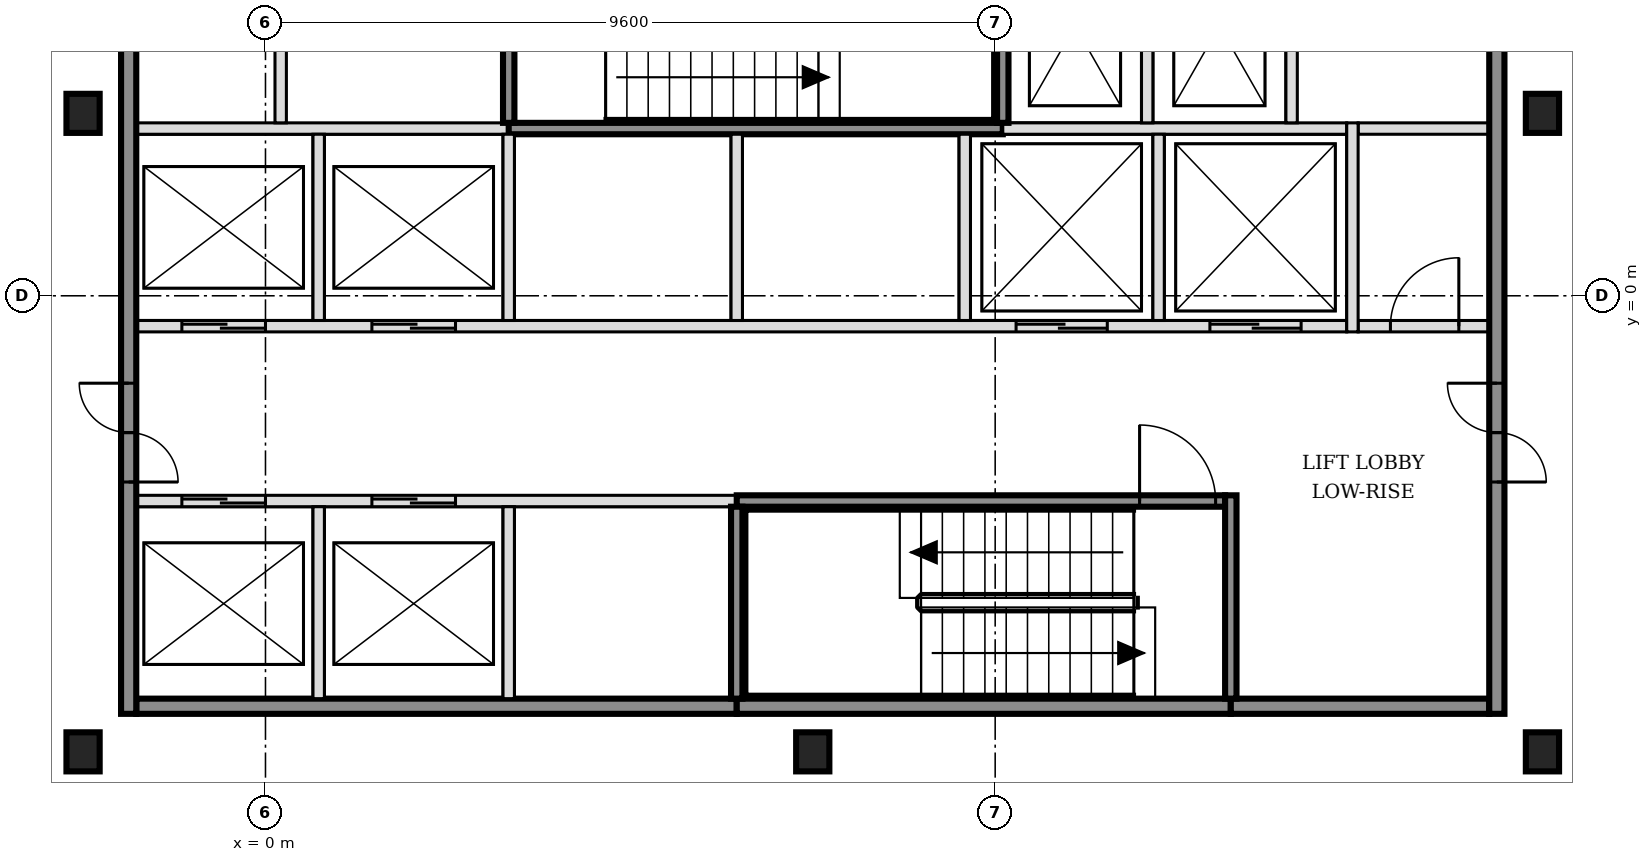
"""IFC4 building model, lengths in metres.
Left out: names, types, materials, properties, quantities, classifications, styles, units other than length and angle.
Written with IfcOpenShell. Run it as: python <this file> out.ifc"""

import sys

from ifc_helpers import new_model, si_unit, direction, frame, frame_2d, origin, origin_2d, place, context, subcontext, project, spatial, rectangle, i_section, extrude, element, fill, save


model = new_model("IFC4")
c1 = context("Model", 3, precision=1e-05, world=origin(), true_north=direction((0.0, 1.0)))
c2 = subcontext(c1, "Body", "Model", "MODEL_VIEW")
j1 = project(units=[si_unit("LENGTHUNIT", "METRE"), si_unit("PLANEANGLEUNIT", "RADIAN")], contexts=[c1])
p1 = place(None, origin())
s1 = spatial("IfcSite", under=j1, at=p1, CompositionType="ELEMENT")
p2 = place(p1, origin())
s2 = spatial("IfcBuilding", under=s1, at=p2, CompositionType="ELEMENT")
p3 = place(p2, frame((0.0, 0.0, 83.4)))
s3 = spatial("IfcBuildingStorey", under=s2, at=p3, CompositionType="ELEMENT", Elevation=83.4)
for number, where, z_axis, x_axis in (
    (1, (-2.4, -6.0, -0.15), (0.0, 0.0, 1.0), (1.0, 0.0, 0.0)),
    (2, (7.2, -6.0, -0.15), (0.0, 0.0, 1.0), (1.0, 0.0, 0.0)),
    (3, (16.8, -6.0, -0.15), (0.0, 0.0, 1.0), (1.0, 0.0, 0.0)),
    (4, (-2.4, 2.4, -0.15), (0.0, 0.0, 1.0), (1.0, 0.0, 0.0)),
    (5, (16.8, 2.4, -0.15), (0.0, 0.0, 1.0), (1.0, 0.0, 0.0)),
):
    element("IfcColumn", number, at=place(p3, frame(where, z_axis=z_axis, x_axis=x_axis)), inside=s3, PredefinedType="COLUMN", context=c2, shape_type="SweptSolid", body=[
        extrude(i_section(OverallWidth=0.437, OverallDepth=0.514, WebThickness=0.061, FlangeThickness=0.097, FilletRadius=0.015, at=origin_2d()), origin(), (0.0, 0.0, 1.0), 3.6),
    ])
p4 = place(p3, frame((-1.7, -5.4, 0.0), z_axis=(0.0, 0.0, 1.0), x_axis=(1.0, 0.0, 0.0)))
e6 = element("IfcWall", 6, at=p4, inside=s3, PredefinedType="SOLIDWALL", context=c2, shape_type="SweptSolid", body=[
    extrude(rectangle(XDim=7.9, YDim=0.2, at=frame_2d((3.95, 0.0))), origin(), (0.0, 0.0, 1.0), 3.45),
])
p5 = place(p3, frame((6.2, -5.4, 0.0), z_axis=(0.0, 0.0, 1.0), x_axis=(1.0, 0.0, 0.0)))
e7 = element("IfcWall", 7, at=p5, inside=s3, PredefinedType="SOLIDWALL", context=c2, shape_type="SweptSolid", body=[
    extrude(rectangle(XDim=6.5, YDim=0.2, at=frame_2d((3.25, 0.0))), origin(), (0.0, 0.0, 1.0), 3.45),
])
p6 = place(p3, frame((12.7, -5.4, 0.0), z_axis=(0.0, 0.0, 1.0), x_axis=(1.0, 0.0, 0.0)))
e8 = element("IfcWall", 8, at=p6, inside=s3, PredefinedType="SOLIDWALL", context=c2, shape_type="SweptSolid", body=[
    extrude(rectangle(XDim=3.4, YDim=0.2, at=frame_2d((1.7, 0.0))), origin(), (0.0, 0.0, 1.0), 3.45),
])
p7 = place(p3, frame((-1.7, -2.7, 0.0), z_axis=(0.0, 0.0, 1.0), x_axis=(1.0, 0.0, 0.0)))
e9 = element("IfcWall", 9, at=p7, inside=s3, PredefinedType="SOLIDWALL", context=c2, shape_type="SweptSolid", body=[
    extrude(rectangle(XDim=7.9, YDim=0.15, at=frame_2d((3.95, 0.0))), origin(), (0.0, 0.0, 1.0), 3.45),
])
p8 = place(p7, frame((0.6, 0.0, 0.0)))
e10 = element("IfcOpeningElement", 10, at=p8, cuts=e9, PredefinedType="OPENING", context=c2, shape_type="SweptSolid", body=[
    extrude(rectangle(XDim=1.1, YDim=2.1, at=frame_2d((0.55, 1.05))), frame((0.0, 0.085, 0.0), z_axis=(0.0, -1.0, 0.0), x_axis=(1.0, 0.0, 0.0)), (0.0, 0.0, 1.0), 0.17),
])
p9 = place(p7, frame((3.1, 0.0, 0.0)))
e11 = element("IfcOpeningElement", 11, at=p9, cuts=e9, PredefinedType="OPENING", context=c2, shape_type="SweptSolid", body=[
    extrude(rectangle(XDim=1.1, YDim=2.1, at=frame_2d((0.55, 1.05))), frame((0.0, 0.085, 0.0), z_axis=(0.0, -1.0, 0.0), x_axis=(1.0, 0.0, 0.0)), (0.0, 0.0, 1.0), 0.17),
])
p10 = place(p3, frame((6.2, -2.7, 0.0), z_axis=(0.0, 0.0, 1.0), x_axis=(1.0, 0.0, 0.0)))
e12 = element("IfcWall", 12, at=p10, inside=s3, PredefinedType="SOLIDWALL", context=c2, shape_type="SweptSolid", body=[
    extrude(rectangle(XDim=6.425, YDim=0.15, at=frame_2d((3.212, 0.0))), origin(), (0.0, 0.0, 1.0), 3.45),
])
p11 = place(p10, frame((5.3, 0.0, 0.0)))
e13 = element("IfcOpeningElement", 13, at=p11, cuts=e12, PredefinedType="OPENING", context=c2, shape_type="SweptSolid", body=[
    extrude(rectangle(XDim=1.0, YDim=2.1, at=frame_2d((0.5, 1.05))), frame((0.0, 0.085, 0.0), z_axis=(0.0, -1.0, 0.0), x_axis=(1.0, 0.0, 0.0)), (0.0, 0.0, 1.0), 0.17),
])
p12 = place(p3, frame((-1.7, -0.4, 0.0), z_axis=(0.0, 0.0, 1.0), x_axis=(1.0, 0.0, 0.0)))
e14 = element("IfcWall", 14, at=p12, inside=s3, PredefinedType="SOLIDWALL", context=c2, shape_type="SweptSolid", body=[
    extrude(rectangle(XDim=15.925, YDim=0.15, at=frame_2d((7.962, 0.0))), origin(), (0.0, 0.0, 1.0), 3.45),
])
p13 = place(p12, frame((0.6, 0.0, 0.0)))
e15 = element("IfcOpeningElement", 15, at=p13, cuts=e14, PredefinedType="OPENING", context=c2, shape_type="SweptSolid", body=[
    extrude(rectangle(XDim=1.1, YDim=2.1, at=frame_2d((0.55, 1.05))), frame((0.0, 0.085, 0.0), z_axis=(0.0, -1.0, 0.0), x_axis=(1.0, 0.0, 0.0)), (0.0, 0.0, 1.0), 0.17),
])
p14 = place(p12, frame((3.1, 0.0, 0.0)))
e16 = element("IfcOpeningElement", 16, at=p14, cuts=e14, PredefinedType="OPENING", context=c2, shape_type="SweptSolid", body=[
    extrude(rectangle(XDim=1.1, YDim=2.1, at=frame_2d((0.55, 1.05))), frame((0.0, 0.085, 0.0), z_axis=(0.0, -1.0, 0.0), x_axis=(1.0, 0.0, 0.0)), (0.0, 0.0, 1.0), 0.17),
])
p15 = place(p12, frame((11.575, 0.0, 0.0)))
e17 = element("IfcOpeningElement", 17, at=p15, cuts=e14, PredefinedType="OPENING", context=c2, shape_type="SweptSolid", body=[
    extrude(rectangle(XDim=1.2, YDim=2.1, at=frame_2d((0.6, 1.05))), frame((0.0, 0.085, 0.0), z_axis=(0.0, -1.0, 0.0), x_axis=(1.0, 0.0, 0.0)), (0.0, 0.0, 1.0), 0.17),
])
p16 = place(p12, frame((14.125, 0.0, 0.0)))
e18 = element("IfcOpeningElement", 18, at=p16, cuts=e14, PredefinedType="OPENING", context=c2, shape_type="SweptSolid", body=[
    extrude(rectangle(XDim=1.2, YDim=2.1, at=frame_2d((0.6, 1.05))), frame((0.0, 0.085, 0.0), z_axis=(0.0, -1.0, 0.0), x_axis=(1.0, 0.0, 0.0)), (0.0, 0.0, 1.0), 0.17),
])
p17 = place(p3, frame((14.375, -0.4, 0.0), z_axis=(0.0, 0.0, 1.0), x_axis=(1.0, 0.0, 0.0)))
e19 = element("IfcWall", 19, at=p17, inside=s3, PredefinedType="PARTITIONING", context=c2, shape_type="SweptSolid", body=[
    extrude(rectangle(XDim=1.725, YDim=0.15, at=frame_2d((0.863, 0.0))), origin(), (0.0, 0.0, 1.0), 3.45),
])
p18 = place(p17, frame((0.425, 0.0, 0.0)))
e20 = element("IfcOpeningElement", 20, at=p18, cuts=e19, PredefinedType="OPENING", context=c2, shape_type="SweptSolid", body=[
    extrude(rectangle(XDim=0.9, YDim=2.1, at=frame_2d((0.45, 1.05))), frame((0.0, 0.085, 0.0), z_axis=(0.0, -1.0, 0.0), x_axis=(1.0, 0.0, 0.0)), (0.0, 0.0, 1.0), 0.17),
])
p19 = place(p3, frame((-1.7, 2.2, 0.0), z_axis=(0.0, 0.0, 1.0), x_axis=(1.0, 0.0, 0.0)))
e21 = element("IfcWall", 21, at=p19, inside=s3, PredefinedType="SOLIDWALL", context=c2, shape_type="SweptSolid", body=[
    extrude(rectangle(XDim=4.9, YDim=0.15, at=frame_2d((2.45, 0.0))), origin(), (0.0, 0.0, 1.0), 3.45),
])
p20 = place(p3, frame((3.2, 2.2, 0.0), z_axis=(0.0, 0.0, 1.0), x_axis=(1.0, 0.0, 0.0)))
e22 = element("IfcWall", 22, at=p20, inside=s3, PredefinedType="SOLIDWALL", context=c2, shape_type="SweptSolid", body=[
    extrude(rectangle(XDim=6.5, YDim=0.15, at=frame_2d((3.25, 0.0))), origin(), (0.0, 0.0, 1.0), 3.45),
])
p21 = place(p3, frame((9.7, 2.2, 0.0), z_axis=(0.0, 0.0, 1.0), x_axis=(1.0, 0.0, 0.0)))
e23 = element("IfcWall", 23, at=p21, inside=s3, PredefinedType="SOLIDWALL", context=c2, shape_type="SweptSolid", body=[
    extrude(rectangle(XDim=4.525, YDim=0.15, at=frame_2d((2.263, 0.0))), origin(), (0.0, 0.0, 1.0), 3.45),
])
p22 = place(p3, frame((14.375, 2.2, 0.0), z_axis=(0.0, 0.0, 1.0), x_axis=(1.0, 0.0, 0.0)))
e24 = element("IfcWall", 24, at=p22, inside=s3, PredefinedType="PARTITIONING", context=c2, shape_type="SweptSolid", body=[
    extrude(rectangle(XDim=1.725, YDim=0.15, at=frame_2d((0.863, 0.0))), origin(), (0.0, 0.0, 1.0), 3.45),
])
p23 = place(p3, frame((-1.8, -5.5, 0.0), z_axis=(0.0, 0.0, 1.0), x_axis=(0.0, 1.0, 0.0)))
e25 = element("IfcWall", 25, at=p23, inside=s3, PredefinedType="SOLIDWALL", context=c2, shape_type="SweptSolid", body=[
    extrude(rectangle(XDim=15.8, YDim=0.2, at=frame_2d((7.9, 0.0))), origin(), (0.0, 0.0, 1.0), 3.45),
])
p24 = place(p23, frame((3.05, 0.0, 0.0)))
e26 = element("IfcOpeningElement", 26, at=p24, cuts=e25, PredefinedType="OPENING", context=c2, shape_type="SweptSolid", body=[
    extrude(rectangle(XDim=1.3, YDim=2.1, at=frame_2d((0.65, 1.05))), frame((0.0, 0.11, 0.0), z_axis=(0.0, -1.0, 0.0), x_axis=(1.0, 0.0, 0.0)), (0.0, 0.0, 1.0), 0.22),
])
p25 = place(p23, frame((11.45, 0.0, 0.0)))
e27 = element("IfcOpeningElement", 27, at=p25, cuts=e25, PredefinedType="OPENING", context=c2, shape_type="SweptSolid", body=[
    extrude(rectangle(XDim=1.3, YDim=2.1, at=frame_2d((0.65, 1.05))), frame((0.0, 0.11, 0.0), z_axis=(0.0, -1.0, 0.0), x_axis=(1.0, 0.0, 0.0)), (0.0, 0.0, 1.0), 0.22),
])
p26 = place(p3, frame((0.2, 2.275, 0.0), z_axis=(0.0, 0.0, 1.0), x_axis=(0.0, 1.0, 0.0)))
e28 = element("IfcWall", 28, at=p26, inside=s3, PredefinedType="PARTITIONING", context=c2, shape_type="SweptSolid", body=[
    extrude(rectangle(XDim=2.55, YDim=0.15, at=frame_2d((1.275, 0.0))), origin(), (0.0, 0.0, 1.0), 3.45),
])
p27 = place(p3, frame((0.7, -5.3, 0.0), z_axis=(0.0, 0.0, 1.0), x_axis=(0.0, 1.0, 0.0)))
e29 = element("IfcWall", 29, at=p27, inside=s3, PredefinedType="SOLIDWALL", context=c2, shape_type="SweptSolid", body=[
    extrude(rectangle(XDim=2.525, YDim=0.15, at=frame_2d((1.263, 0.0))), origin(), (0.0, 0.0, 1.0), 3.45),
])
p28 = place(p3, frame((0.7, -0.325, 0.0), z_axis=(0.0, 0.0, 1.0), x_axis=(0.0, 1.0, 0.0)))
e30 = element("IfcWall", 30, at=p28, inside=s3, PredefinedType="SOLIDWALL", context=c2, shape_type="SweptSolid", body=[
    extrude(rectangle(XDim=2.45, YDim=0.15, at=frame_2d((1.225, 0.0))), origin(), (0.0, 0.0, 1.0), 3.45),
])
p29 = place(p3, frame((3.2, -5.3, 0.0), z_axis=(0.0, 0.0, 1.0), x_axis=(0.0, 1.0, 0.0)))
e31 = element("IfcWall", 31, at=p29, inside=s3, PredefinedType="SOLIDWALL", context=c2, shape_type="SweptSolid", body=[
    extrude(rectangle(XDim=2.525, YDim=0.15, at=frame_2d((1.263, 0.0))), origin(), (0.0, 0.0, 1.0), 3.45),
])
p30 = place(p3, frame((3.2, -0.325, 0.0), z_axis=(0.0, 0.0, 1.0), x_axis=(0.0, 1.0, 0.0)))
e32 = element("IfcWall", 32, at=p30, inside=s3, PredefinedType="SOLIDWALL", context=c2, shape_type="SweptSolid", body=[
    extrude(rectangle(XDim=2.45, YDim=0.15, at=frame_2d((1.225, 0.0))), origin(), (0.0, 0.0, 1.0), 3.45),
])
p31 = place(p3, frame((3.2, 2.275, 0.0), z_axis=(0.0, 0.0, 1.0), x_axis=(0.0, 1.0, 0.0)))
e33 = element("IfcWall", 33, at=p31, inside=s3, PredefinedType="SOLIDWALL", context=c2, shape_type="SweptSolid", body=[
    extrude(rectangle(XDim=2.7, YDim=0.15, at=frame_2d((1.35, 0.0))), origin(), (0.0, 0.0, 1.0), 3.45),
])
p32 = place(p3, frame((6.2, -5.3, 0.0), z_axis=(0.0, 0.0, 1.0), x_axis=(0.0, 1.0, 0.0)))
e34 = element("IfcWall", 34, at=p32, inside=s3, PredefinedType="SOLIDWALL", context=c2, shape_type="SweptSolid", body=[
    extrude(rectangle(XDim=2.525, YDim=0.15, at=frame_2d((1.263, 0.0))), origin(), (0.0, 0.0, 1.0), 3.45),
])
for number, where, z_axis, x_axis in (
    (35, (6.2, -0.325, 0.0), (0.0, 0.0, 1.0), (0.0, 1.0, 0.0)),
    (36, (9.2, -0.325, 0.0), (0.0, 0.0, 1.0), (0.0, 1.0, 0.0)),
):
    element("IfcWall", number, at=place(p3, frame(where, z_axis=z_axis, x_axis=x_axis)), inside=s3, PredefinedType="SOLIDWALL", context=c2, shape_type="SweptSolid", body=[
        extrude(rectangle(XDim=2.45, YDim=0.15, at=frame_2d((1.225, 0.0))), origin(), (0.0, 0.0, 1.0), 3.45),
    ])
for number, where, z_axis, x_axis in (
    (37, (9.7, 2.275, 0.0), (0.0, 0.0, 1.0), (0.0, 1.0, 0.0)),
    (38, (11.6, 2.275, 0.0), (0.0, 0.0, 1.0), (0.0, 1.0, 0.0)),
):
    element("IfcWall", number, at=place(p3, frame(where, z_axis=z_axis, x_axis=x_axis)), inside=s3, PredefinedType="SOLIDWALL", context=c2, shape_type="SweptSolid", body=[
        extrude(rectangle(XDim=2.55, YDim=0.15, at=frame_2d((1.275, 0.0))), origin(), (0.0, 0.0, 1.0), 3.45),
    ])
p33 = place(p3, frame((11.75, -0.325, 0.0), z_axis=(0.0, 0.0, 1.0), x_axis=(0.0, 1.0, 0.0)))
e39 = element("IfcWall", 39, at=p33, inside=s3, PredefinedType="SOLIDWALL", context=c2, shape_type="SweptSolid", body=[
    extrude(rectangle(XDim=2.45, YDim=0.15, at=frame_2d((1.225, 0.0))), origin(), (0.0, 0.0, 1.0), 3.45),
])
p34 = place(p3, frame((12.7, -5.3, 0.0), z_axis=(0.0, 0.0, 1.0), x_axis=(0.0, 1.0, 0.0)))
e40 = element("IfcWall", 40, at=p34, inside=s3, PredefinedType="SOLIDWALL", context=c2, shape_type="SweptSolid", body=[
    extrude(rectangle(XDim=2.675, YDim=0.15, at=frame_2d((1.337, 0.0))), origin(), (0.0, 0.0, 1.0), 3.45),
])
p35 = place(p3, frame((13.5, 2.275, 0.0), z_axis=(0.0, 0.0, 1.0), x_axis=(0.0, 1.0, 0.0)))
e41 = element("IfcWall", 41, at=p35, inside=s3, PredefinedType="SOLIDWALL", context=c2, shape_type="SweptSolid", body=[
    extrude(rectangle(XDim=2.55, YDim=0.15, at=frame_2d((1.275, 0.0))), origin(), (0.0, 0.0, 1.0), 3.45),
])
p36 = place(p3, frame((14.3, -0.475, 0.0), z_axis=(0.0, 0.0, 1.0), x_axis=(0.0, 1.0, 0.0)))
e42 = element("IfcWall", 42, at=p36, inside=s3, PredefinedType="SOLIDWALL", context=c2, shape_type="SweptSolid", body=[
    extrude(rectangle(XDim=2.75, YDim=0.15, at=frame_2d((1.375, 0.0))), origin(), (0.0, 0.0, 1.0), 3.45),
])
p37 = place(p3, frame((16.2, -5.5, 0.0), z_axis=(0.0, 0.0, 1.0), x_axis=(0.0, 1.0, 0.0)))
e43 = element("IfcWall", 43, at=p37, inside=s3, PredefinedType="SOLIDWALL", context=c2, shape_type="SweptSolid", body=[
    extrude(rectangle(XDim=15.8, YDim=0.2, at=frame_2d((7.9, 0.0))), origin(), (0.0, 0.0, 1.0), 3.45),
])
p38 = place(p37, frame((3.05, 0.0, 0.0)))
e44 = element("IfcOpeningElement", 44, at=p38, cuts=e43, PredefinedType="OPENING", context=c2, shape_type="SweptSolid", body=[
    extrude(rectangle(XDim=1.3, YDim=2.1, at=frame_2d((0.65, 1.05))), frame((0.0, 0.11, 0.0), z_axis=(0.0, -1.0, 0.0), x_axis=(1.0, 0.0, 0.0)), (0.0, 0.0, 1.0), 0.22),
])
p39 = place(p37, frame((11.45, 0.0, 0.0)))
e45 = element("IfcOpeningElement", 45, at=p39, cuts=e43, PredefinedType="OPENING", context=c2, shape_type="SweptSolid", body=[
    extrude(rectangle(XDim=1.3, YDim=2.1, at=frame_2d((0.65, 1.05))), frame((0.0, 0.11, 0.0), z_axis=(0.0, -1.0, 0.0), x_axis=(1.0, 0.0, 0.0)), (0.0, 0.0, 1.0), 0.22),
])
p40 = place(p8, origin())
e46 = element("IfcDoor", 46, at=p40, inside=s3, OperationType="DOUBLE_DOOR_SLIDING", PredefinedType="DOOR", context=c2, shape_type="SweptSolid", body=[
    extrude(rectangle(XDim=1.1, YDim=2.1, at=frame_2d((0.55, 1.05))), frame((0.0, 0.025, 0.0), z_axis=(0.0, -1.0, 0.0), x_axis=(1.0, 0.0, 0.0)), (0.0, 0.0, 1.0), 0.05),
])
fill(e10, e46)
p41 = place(p9, origin())
e47 = element("IfcDoor", 47, at=p41, inside=s3, OperationType="DOUBLE_DOOR_SLIDING", PredefinedType="DOOR", context=c2, shape_type="SweptSolid", body=[
    extrude(rectangle(XDim=1.1, YDim=2.1, at=frame_2d((0.55, 1.05))), frame((0.0, 0.025, 0.0), z_axis=(0.0, -1.0, 0.0), x_axis=(1.0, 0.0, 0.0)), (0.0, 0.0, 1.0), 0.05),
])
fill(e11, e47)
p42 = place(p13, origin())
e48 = element("IfcDoor", 48, at=p42, inside=s3, OperationType="DOUBLE_DOOR_SLIDING", PredefinedType="DOOR", context=c2, shape_type="SweptSolid", body=[
    extrude(rectangle(XDim=1.1, YDim=2.1, at=frame_2d((0.55, 1.05))), frame((0.0, 0.025, 0.0), z_axis=(0.0, -1.0, 0.0), x_axis=(1.0, 0.0, 0.0)), (0.0, 0.0, 1.0), 0.05),
])
fill(e15, e48)
p43 = place(p14, origin())
e49 = element("IfcDoor", 49, at=p43, inside=s3, OperationType="DOUBLE_DOOR_SLIDING", PredefinedType="DOOR", context=c2, shape_type="SweptSolid", body=[
    extrude(rectangle(XDim=1.1, YDim=2.1, at=frame_2d((0.55, 1.05))), frame((0.0, 0.025, 0.0), z_axis=(0.0, -1.0, 0.0), x_axis=(1.0, 0.0, 0.0)), (0.0, 0.0, 1.0), 0.05),
])
fill(e16, e49)
p44 = place(p15, origin())
e50 = element("IfcDoor", 50, at=p44, inside=s3, OperationType="DOUBLE_DOOR_SLIDING", PredefinedType="DOOR", context=c2, shape_type="SweptSolid", body=[
    extrude(rectangle(XDim=1.2, YDim=2.1, at=frame_2d((0.6, 1.05))), frame((0.0, 0.025, 0.0), z_axis=(0.0, -1.0, 0.0), x_axis=(1.0, 0.0, 0.0)), (0.0, 0.0, 1.0), 0.05),
])
fill(e17, e50)
p45 = place(p16, origin())
e51 = element("IfcDoor", 51, at=p45, inside=s3, OperationType="DOUBLE_DOOR_SLIDING", PredefinedType="DOOR", context=c2, shape_type="SweptSolid", body=[
    extrude(rectangle(XDim=1.2, YDim=2.1, at=frame_2d((0.6, 1.05))), frame((0.0, 0.025, 0.0), z_axis=(0.0, -1.0, 0.0), x_axis=(1.0, 0.0, 0.0)), (0.0, 0.0, 1.0), 0.05),
])
fill(e18, e51)
p46 = place(p11, origin())
e52 = element("IfcDoor", 52, at=p46, inside=s3, OperationType="SINGLE_SWING_LEFT", PredefinedType="DOOR", context=c2, shape_type="SweptSolid", body=[
    extrude(rectangle(XDim=1.0, YDim=2.1, at=frame_2d((0.5, 1.05))), frame((0.0, 0.025, 0.0), z_axis=(0.0, -1.0, 0.0), x_axis=(1.0, 0.0, 0.0)), (0.0, 0.0, 1.0), 0.05),
])
fill(e13, e52)
p47 = place(p24, origin())
e53 = element("IfcDoor", 53, at=p47, inside=s3, OperationType="DOUBLE_DOOR_SINGLE_SWING", PredefinedType="DOOR", context=c2, shape_type="SweptSolid", body=[
    extrude(rectangle(XDim=1.3, YDim=2.1, at=frame_2d((0.65, 1.05))), frame((0.0, 0.025, 0.0), z_axis=(0.0, -1.0, 0.0), x_axis=(1.0, 0.0, 0.0)), (0.0, 0.0, 1.0), 0.05),
])
fill(e26, e53)
p48 = place(p38, origin())
e54 = element("IfcDoor", 54, at=p48, inside=s3, OperationType="DOUBLE_DOOR_SINGLE_SWING", PredefinedType="DOOR", context=c2, shape_type="SweptSolid", body=[
    extrude(rectangle(XDim=1.3, YDim=2.1, at=frame_2d((0.65, 1.05))), frame((0.0, 0.025, 0.0), z_axis=(0.0, -1.0, 0.0), x_axis=(1.0, 0.0, 0.0)), (0.0, 0.0, 1.0), 0.05),
])
fill(e44, e54)
p49 = place(p18, origin())
e55 = element("IfcDoor", 55, at=p49, inside=s3, OperationType="SINGLE_SWING_RIGHT", PredefinedType="DOOR", context=c2, shape_type="SweptSolid", body=[
    extrude(rectangle(XDim=0.9, YDim=2.1, at=frame_2d((0.45, 1.05))), frame((0.0, 0.025, 0.0), z_axis=(0.0, -1.0, 0.0), x_axis=(1.0, 0.0, 0.0)), (0.0, 0.0, 1.0), 0.05),
])
fill(e20, e55)
save(model, sys.argv[1])
